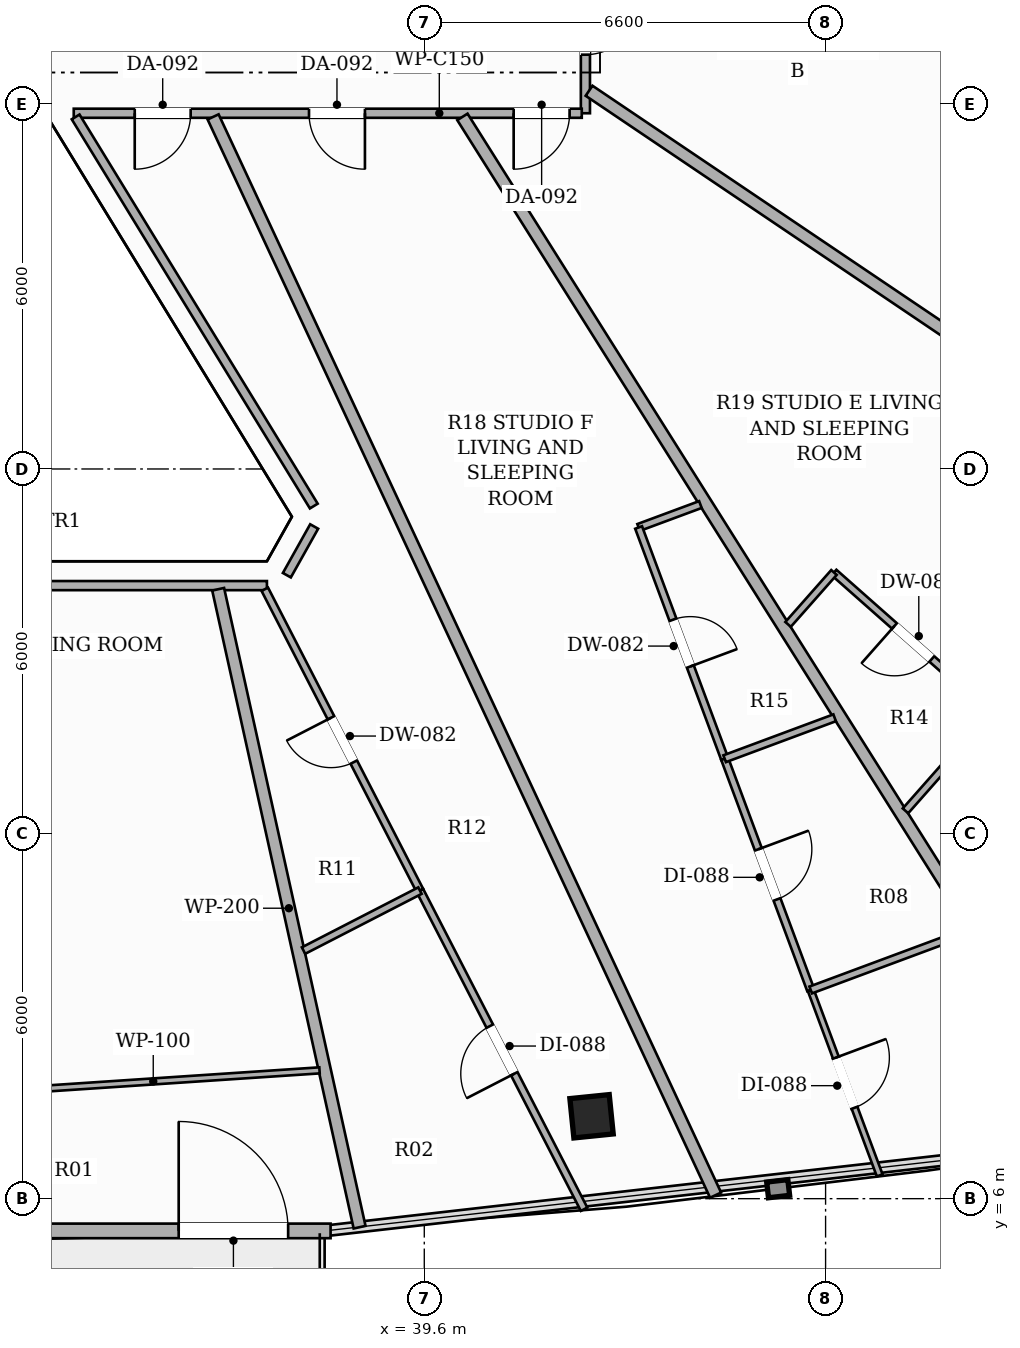
"""IFC4 building model, lengths in metres.
Left out: names, types, materials, properties, quantities, classifications, styles, units other than length and angle.
Written with IfcOpenShell. Run it as: python <this file> out.ifc"""

import sys

from ifc_helpers import new_model, si_unit, direction, frame, frame_2d, origin, origin_2d, place, context, subcontext, project, spatial, rectangle, hollow_rectangle, extrude, element, fill, save


model = new_model("IFC4")
c1 = context("Model", 3, precision=1e-05, world=origin(), true_north=direction((0.0, 1.0)))
c2 = subcontext(c1, "Body", "Model", "MODEL_VIEW")
j1 = project(units=[si_unit("LENGTHUNIT", "METRE"), si_unit("PLANEANGLEUNIT", "RADIAN")], contexts=[c1])
p1 = place(None, origin())
s1 = spatial("IfcSite", under=j1, at=p1, CompositionType="ELEMENT")
p2 = place(p1, origin())
s2 = spatial("IfcBuilding", under=s1, at=p2, CompositionType="ELEMENT")
p3 = place(p2, frame((0.0, 0.0, 256.85)))
s3 = spatial("IfcBuildingStorey", under=s2, at=p3, CompositionType="ELEMENT", Elevation=256.85)
p4 = place(p3, frame((42.351, 7.355, 0.0), z_axis=(0.0, 0.0, 1.0), x_axis=(0.994880708829, 0.101056297183, 0.0)))
e1 = element("IfcColumn", 1, at=p4, inside=s3, PredefinedType="COLUMN", context=c2, shape_type="SweptSolid", body=[
    extrude(hollow_rectangle(XDim=0.65, YDim=0.65, WallThickness=0.022, at=origin_2d()), origin(), (0.0, 0.0, 1.0), 3.3),
])
p5 = place(p3, frame((27.941, 5.47, 0.0), z_axis=(0.0, 0.0, 1.0), x_axis=(1.0, 0.0, 0.0)))
e2 = element("IfcWall", 2, at=p5, inside=s3, PredefinedType="SOLIDWALL", context=c2, shape_type="SweptSolid", body=[
    extrude(rectangle(XDim=10.118, YDim=0.24, at=frame_2d((5.059, 0.0))), origin(), (0.0, 0.0, 1.0), 2.624),
])
p6 = place(p5, frame((7.62, 0.0, 0.0)))
e3 = element("IfcOpeningElement", 3, at=p6, cuts=e2, PredefinedType="OPENING", context=c2, shape_type="SweptSolid", body=[
    extrude(rectangle(XDim=1.8, YDim=2.2, at=frame_2d((0.9, 1.1))), frame((0.0, 0.13, 0.0), z_axis=(0.0, -1.0, 0.0), x_axis=(1.0, 0.0, 0.0)), (0.0, 0.0, 1.0), 0.26),
])
p7 = place(p3, frame((49.146, 24.147, 0.0), z_axis=(0.0, 0.0, 1.0), x_axis=(-0.514275407092, 0.857625096216, 0.0)))
e4 = element("IfcWall", 4, at=p7, inside=s3, PredefinedType="SOLIDWALL", context=c2, shape_type="SweptSolid", body=[
    extrude(rectangle(XDim=9.777, YDim=0.24, at=frame_2d((4.889, 0.0))), origin(), (0.0, 0.0, 1.0), 2.624),
])
p8 = place(p7, frame((7.279, 0.0, 0.0)))
e5 = element("IfcOpeningElement", 5, at=p8, cuts=e4, PredefinedType="OPENING", context=c2, shape_type="SweptSolid", body=[
    extrude(rectangle(XDim=1.8, YDim=2.2, at=frame_2d((0.9, 1.1))), frame((0.0, 0.13, 0.0), z_axis=(0.0, -1.0, 0.0), x_axis=(1.0, 0.0, 0.0)), (0.0, 0.0, 1.0), 0.26),
])
p9 = place(p3, frame((42.25, 26.59, 0.0), z_axis=(0.0, 0.0, 1.0), x_axis=(0.0, -1.0, 0.0)))
e6 = element("IfcWall", 6, at=p9, inside=s3, PredefinedType="PARTITIONING", context=c2, shape_type="SweptSolid", body=[
    extrude(rectangle(XDim=2.74, YDim=0.15, at=frame_2d((1.37, 0.0))), origin(), (0.0, 0.0, 1.0), 2.773),
])
p10 = place(p9, frame((0.897, 0.0, 0.0)))
e7 = element("IfcOpeningElement", 7, at=p10, cuts=e6, PredefinedType="OPENING", context=c2, shape_type="SweptSolid", body=[
    extrude(rectangle(XDim=0.88, YDim=2.1, at=frame_2d((0.44, 1.05))), frame((0.0, 0.085, 0.0), z_axis=(0.0, -1.0, 0.0), x_axis=(1.0, 0.0, 0.0)), (0.0, 0.0, 1.0), 0.17),
])
p11 = place(p3, frame((42.19, 23.85, 0.0), z_axis=(0.0, 0.0, 1.0), x_axis=(-1.0, 0.0, 0.0)))
e8 = element("IfcWall", 8, at=p11, inside=s3, PredefinedType="PARTITIONING", context=c2, shape_type="SweptSolid", body=[
    extrude(rectangle(XDim=8.355, YDim=0.15, at=frame_2d((4.177, 0.0))), origin(), (0.0, 0.0, 1.0), 2.565),
])
p12 = place(p11, frame((0.2, 0.0, 0.0)))
e9 = element("IfcOpeningElement", 9, at=p12, cuts=e8, PredefinedType="OPENING", context=c2, shape_type="SweptSolid", body=[
    extrude(rectangle(XDim=0.92, YDim=2.15, at=frame_2d((0.46, 1.075))), frame((0.0, 0.085, 0.0), z_axis=(0.0, -1.0, 0.0), x_axis=(1.0, 0.0, 0.0)), (0.0, 0.0, 1.0), 0.17),
])
p13 = place(p11, frame((3.566, 0.0, 0.0)))
e10 = element("IfcOpeningElement", 10, at=p13, cuts=e8, PredefinedType="OPENING", context=c2, shape_type="SweptSolid", body=[
    extrude(rectangle(XDim=0.92, YDim=2.15, at=frame_2d((0.46, 1.075))), frame((0.0, 0.085, 0.0), z_axis=(0.0, -1.0, 0.0), x_axis=(1.0, 0.0, 0.0)), (0.0, 0.0, 1.0), 0.17),
])
p14 = place(p11, frame((6.432, 0.0, 0.0)))
e11 = element("IfcOpeningElement", 11, at=p14, cuts=e8, PredefinedType="OPENING", context=c2, shape_type="SweptSolid", body=[
    extrude(rectangle(XDim=0.92, YDim=2.15, at=frame_2d((0.46, 1.075))), frame((0.0, 0.085, 0.0), z_axis=(0.0, -1.0, 0.0), x_axis=(1.0, 0.0, 0.0)), (0.0, 0.0, 1.0), 0.17),
])
p15 = place(p3, frame((33.866, 23.79, 0.0), z_axis=(0.0, 0.0, 1.0), x_axis=(0.522011859837, -0.852938226479, 0.0)))
e12 = element("IfcWall", 12, at=p15, inside=s3, PredefinedType="PARTITIONING", context=c2, shape_type="SweptSolid", body=[
    extrude(rectangle(XDim=7.504, YDim=0.15, at=frame_2d((3.752, 0.0))), origin(), (0.0, 0.0, 1.0), 2.773),
])
p16 = place(p3, frame((37.789, 17.054, 0.0), z_axis=(0.0, 0.0, 1.0), x_axis=(-0.488935266506, -0.872320070368, 0.0)))
e13 = element("IfcWall", 13, at=p16, inside=s3, PredefinedType="PARTITIONING", context=c2, shape_type="SweptSolid", body=[
    extrude(rectangle(XDim=0.918, YDim=0.15, at=frame_2d((0.459, 0.0))), origin(), (0.0, 0.0, 1.0), 3.06),
])
p17 = place(p3, frame((37.012, 16.082, 0.0), z_axis=(0.0, 0.0, 1.0), x_axis=(-1.0, 0.0, 0.0)))
e14 = element("IfcWall", 14, at=p17, inside=s3, PredefinedType="PARTITIONING", context=c2, shape_type="SweptSolid", body=[
    extrude(rectangle(XDim=8.024, YDim=0.15, at=frame_2d((4.012, 0.0))), origin(), (0.0, 0.0, 1.0), 2.773),
])
p18 = place(p3, frame((36.21, 16.022, 0.0), z_axis=(0.0, 0.0, 1.0), x_axis=(0.216451711791, -0.976293325012, 0.0)))
e15 = element("IfcWall", 15, at=p18, inside=s3, PredefinedType="PARTITIONING", context=c2, shape_type="SweptSolid", body=[
    extrude(rectangle(XDim=10.746, YDim=0.2, at=frame_2d((5.373, 0.0))), origin(), (0.0, 0.0, 1.0), 2.492),
])
p19 = place(p3, frame((52.284, 17.493, 0.0), z_axis=(0.0, 0.0, 1.0), x_axis=(-0.829053532208, 0.559169241584, 0.0)))
e16 = element("IfcWall", 16, at=p19, inside=s3, PredefinedType="PARTITIONING", context=c2, shape_type="SweptSolid", body=[
    extrude(rectangle(XDim=12.031, YDim=0.2, at=frame_2d((6.015, 0.0))), origin(), (0.0, 0.0, 1.0), 2.492),
])
p20 = place(p3, frame((50.863, 6.899, 0.0), z_axis=(0.0, 0.0, 1.0), x_axis=(-0.532843438342, 0.846213844259, 0.0)))
e17 = element("IfcWall", 17, at=p20, inside=s3, PredefinedType="PARTITIONING", context=c2, shape_type="SweptSolid", body=[
    extrude(rectangle(XDim=19.961, YDim=0.2, at=frame_2d((9.98, 0.0))), origin(), (0.0, 0.0, 1.0), 2.492),
])
p21 = place(p3, frame((44.391, 6.058, 0.0), z_axis=(0.0, 0.0, 1.0), x_axis=(-0.422434507673, 0.906393450289, 0.0)))
e18 = element("IfcWall", 18, at=p21, inside=s3, PredefinedType="PARTITIONING", context=c2, shape_type="SweptSolid", body=[
    extrude(rectangle(XDim=19.563, YDim=0.2, at=frame_2d((9.782, 0.0))), origin(), (0.0, 0.0, 1.0), 2.492),
])
p22 = place(p3, frame((37.877, 8.11, 0.0), z_axis=(0.0, 0.0, 1.0), x_axis=(-0.997794804299, -0.066374155471, 0.0)))
e19 = element("IfcWall", 19, at=p22, inside=s3, PredefinedType="PARTITIONING", context=c2, shape_type="SweptSolid", body=[
    extrude(rectangle(XDim=10.851, YDim=0.1, at=frame_2d((5.425, 0.0))), origin(), (0.0, 0.0, 1.0), 2.492),
])
p23 = place(p22, frame((5.581, 0.0, 0.0)))
e20 = element("IfcOpeningElement", 20, at=p23, cuts=e19, PredefinedType="OPENING", context=c2, shape_type="SweptSolid", body=[
    extrude(rectangle(XDim=0.88, YDim=2.1, at=frame_2d((0.44, 1.05))), frame((0.0, 0.06, 0.0), z_axis=(0.0, -1.0, 0.0), x_axis=(1.0, 0.0, 0.0)), (0.0, 0.0, 1.0), 0.12),
])
p24 = place(p3, frame((48.943, 13.995, 0.0), z_axis=(0.0, 0.0, 1.0), x_axis=(-0.749231040751, 0.662308725275, 0.0)))
e21 = element("IfcWall", 21, at=p24, inside=s3, PredefinedType="PARTITIONING", context=c2, shape_type="SweptSolid", body=[
    extrude(rectangle(XDim=3.477, YDim=0.12, at=frame_2d((1.739, 0.0))), origin(), (0.0, 0.0, 1.0), 2.565),
])
p25 = place(p24, frame((1.329, 0.0, 0.0)))
e22 = element("IfcOpeningElement", 22, at=p25, cuts=e21, PredefinedType="OPENING", context=c2, shape_type="SweptSolid", body=[
    extrude(rectangle(XDim=0.82, YDim=2.1, at=frame_2d((0.41, 1.05))), frame((0.0, 0.07, 0.0), z_axis=(0.0, -1.0, 0.0), x_axis=(1.0, 0.0, 0.0)), (0.0, 0.0, 1.0), 0.14),
])
p26 = place(p3, frame((46.338, 16.298, 0.0), z_axis=(0.0, 0.0, 1.0), x_axis=(-0.662287293934, -0.749249985181, 0.0)))
e23 = element("IfcWall", 23, at=p26, inside=s3, PredefinedType="PARTITIONING", context=c2, shape_type="SweptSolid", body=[
    extrude(rectangle(XDim=1.14, YDim=0.12, at=frame_2d((0.57, 0.0))), origin(), (0.0, 0.0, 1.0), 3.06),
])
p27 = place(p3, frame((48.943, 13.995, 0.0), z_axis=(0.0, 0.0, 1.0), x_axis=(-0.662212567735, -0.749316031547, 0.0)))
e24 = element("IfcWall", 24, at=p27, inside=s3, PredefinedType="PARTITIONING", context=c2, shape_type="SweptSolid", body=[
    extrude(rectangle(XDim=2.158, YDim=0.12, at=frame_2d((1.079, 0.0))), origin(), (0.0, 0.0, 1.0), 2.565),
])
p28 = place(p3, frame((44.141, 17.415, 0.0), z_axis=(0.0, 0.0, 1.0), x_axis=(-0.937563848777, -0.347813210599, 0.0)))
e25 = element("IfcWall", 25, at=p28, inside=s3, PredefinedType="PARTITIONING", context=c2, shape_type="SweptSolid", body=[
    extrude(rectangle(XDim=1.084, YDim=0.12, at=frame_2d((0.542, 0.0))), origin(), (0.0, 0.0, 1.0), 2.773),
])
p29 = place(p3, frame((43.125, 17.038, 0.0), z_axis=(0.0, 0.0, 1.0), x_axis=(0.348728795746, -0.937223680355, 0.0)))
e26 = element("IfcWall", 26, at=p29, inside=s3, PredefinedType="PARTITIONING", context=c2, shape_type="SweptSolid", body=[
    extrude(rectangle(XDim=4.058, YDim=0.12, at=frame_2d((2.029, 0.0))), origin(), (0.0, 0.0, 1.0), 2.773),
])
p30 = place(p29, frame((1.619, 0.0, 0.0)))
e27 = element("IfcOpeningElement", 27, at=p30, cuts=e26, PredefinedType="OPENING", context=c2, shape_type="SweptSolid", body=[
    extrude(rectangle(XDim=0.82, YDim=2.1, at=frame_2d((0.41, 1.05))), frame((0.0, 0.07, 0.0), z_axis=(0.0, -1.0, 0.0), x_axis=(1.0, 0.0, 0.0)), (0.0, 0.0, 1.0), 0.14),
])
p31 = place(p3, frame((44.54, 13.235, 0.0), z_axis=(0.0, 0.0, 1.0), x_axis=(0.348709131935, -0.937230996769, 0.0)))
e28 = element("IfcWall", 28, at=p31, inside=s3, PredefinedType="PARTITIONING", context=c2, shape_type="SweptSolid", body=[
    extrude(rectangle(XDim=4.058, YDim=0.12, at=frame_2d((2.029, 0.0))), origin(), (0.0, 0.0, 1.0), 3.06),
])
p32 = place(p31, frame((1.589, 0.0, 0.0)))
e29 = element("IfcOpeningElement", 29, at=p32, cuts=e28, PredefinedType="OPENING", context=c2, shape_type="SweptSolid", body=[
    extrude(rectangle(XDim=0.88, YDim=2.1, at=frame_2d((0.44, 1.05))), frame((0.0, 0.07, 0.0), z_axis=(0.0, -1.0, 0.0), x_axis=(1.0, 0.0, 0.0)), (0.0, 0.0, 1.0), 0.14),
])
p33 = place(p3, frame((45.955, 9.432, 0.0), z_axis=(0.0, 0.0, 1.0), x_axis=(0.34888547359, -0.937165367647, 0.0)))
e30 = element("IfcWall", 30, at=p33, inside=s3, PredefinedType="PARTITIONING", context=c2, shape_type="SweptSolid", body=[
    extrude(rectangle(XDim=3.253, YDim=0.1, at=frame_2d((1.626, 0.0))), origin(), (0.0, 0.0, 1.0), 2.492),
])
p34 = place(p33, frame((1.187, 0.0, 0.0)))
e31 = element("IfcOpeningElement", 31, at=p34, cuts=e30, PredefinedType="OPENING", context=c2, shape_type="SweptSolid", body=[
    extrude(rectangle(XDim=0.88, YDim=2.1, at=frame_2d((0.44, 1.05))), frame((0.0, 0.06, 0.0), z_axis=(0.0, -1.0, 0.0), x_axis=(1.0, 0.0, 0.0)), (0.0, 0.0, 1.0), 0.12),
])
p35 = place(p3, frame((46.349, 13.908, 0.0), z_axis=(0.0, 0.0, 1.0), x_axis=(-0.937271835507, -0.348599349347, 0.0)))
e32 = element("IfcWall", 32, at=p35, inside=s3, PredefinedType="PARTITIONING", context=c2, shape_type="SweptSolid", body=[
    extrude(rectangle(XDim=1.93, YDim=0.12, at=frame_2d((0.965, 0.0))), origin(), (0.0, 0.0, 1.0), 2.773),
])
p36 = place(p3, frame((48.558, 10.4, 0.0), z_axis=(0.0, 0.0, 1.0), x_axis=(-0.937286649549, -0.34855951655, 0.0)))
e33 = element("IfcWall", 33, at=p36, inside=s3, PredefinedType="PARTITIONING", context=c2, shape_type="SweptSolid", body=[
    extrude(rectangle(XDim=2.777, YDim=0.12, at=frame_2d((1.389, 0.0))), origin(), (0.0, 0.0, 1.0), 2.773),
])
p37 = place(p3, frame((39.529, 11.066, 0.0), z_axis=(0.0, 0.0, 1.0), x_axis=(-0.457798211716, 0.889056127221, 0.0)))
e34 = element("IfcWall", 34, at=p37, inside=s3, PredefinedType="PARTITIONING", context=c2, shape_type="SweptSolid", body=[
    extrude(rectangle(XDim=5.574, YDim=0.12, at=frame_2d((2.787, 0.0))), origin(), (0.0, 0.0, 1.0), 2.773),
])
p38 = place(p37, frame((2.377, 0.0, 0.0)))
e35 = element("IfcOpeningElement", 35, at=p38, cuts=e34, PredefinedType="OPENING", context=c2, shape_type="SweptSolid", body=[
    extrude(rectangle(XDim=0.82, YDim=2.1, at=frame_2d((0.41, 1.05))), frame((0.0, 0.07, 0.0), z_axis=(0.0, -1.0, 0.0), x_axis=(1.0, 0.0, 0.0)), (0.0, 0.0, 1.0), 0.14),
])
p39 = place(p3, frame((42.228, 5.826, 0.0), z_axis=(0.0, 0.0, 1.0), x_axis=(-0.457901041138, 0.889003170143, 0.0)))
e36 = element("IfcWall", 36, at=p39, inside=s3, PredefinedType="PARTITIONING", context=c2, shape_type="SweptSolid", body=[
    extrude(rectangle(XDim=5.894, YDim=0.12, at=frame_2d((2.947, 0.0))), origin(), (0.0, 0.0, 1.0), 2.492),
])
p40 = place(p39, frame((2.507, 0.0, 0.0)))
e37 = element("IfcOpeningElement", 37, at=p40, cuts=e36, PredefinedType="OPENING", context=c2, shape_type="SweptSolid", body=[
    extrude(rectangle(XDim=0.88, YDim=2.1, at=frame_2d((0.44, 1.05))), frame((0.0, 0.07, 0.0), z_axis=(0.0, -1.0, 0.0), x_axis=(1.0, 0.0, 0.0)), (0.0, 0.0, 1.0), 0.14),
])
p41 = place(p3, frame((39.529, 11.066, 0.0), z_axis=(0.0, 0.0, 1.0), x_axis=(-0.889105964634, -0.457701413207, 0.0)))
e38 = element("IfcWall", 38, at=p41, inside=s3, PredefinedType="PARTITIONING", context=c2, shape_type="SweptSolid", body=[
    extrude(rectangle(XDim=2.154, YDim=0.12, at=frame_2d((1.077, 0.0))), origin(), (0.0, 0.0, 1.0), 2.773),
])
p42 = place(p6, origin())
e39 = element("IfcDoor", 39, at=p42, inside=s3, OperationType="SINGLE_SWING_LEFT", PredefinedType="DOOR", context=c2, shape_type="SweptSolid", body=[
    extrude(rectangle(XDim=1.8, YDim=2.2, at=frame_2d((0.9, 1.1))), frame((0.0, 0.025, 0.0), z_axis=(0.0, -1.0, 0.0), x_axis=(1.0, 0.0, 0.0)), (0.0, 0.0, 1.0), 0.05),
])
fill(e3, e39)
p43 = place(p10, origin())
e40 = element("IfcDoor", 40, at=p43, inside=s3, OperationType="SINGLE_SWING_LEFT", PredefinedType="DOOR", context=c2, shape_type="SweptSolid", body=[
    extrude(rectangle(XDim=0.88, YDim=2.1, at=frame_2d((0.44, 1.05))), frame((0.0, 0.025, 0.0), z_axis=(0.0, -1.0, 0.0), x_axis=(1.0, 0.0, 0.0)), (0.0, 0.0, 1.0), 0.05),
])
fill(e7, e40)
p44 = place(p12, origin())
e41 = element("IfcDoor", 41, at=p44, inside=s3, OperationType="SINGLE_SWING_RIGHT", PredefinedType="DOOR", context=c2, shape_type="SweptSolid", body=[
    extrude(rectangle(XDim=0.92, YDim=2.15, at=frame_2d((0.46, 1.075))), frame((0.0, 0.025, 0.0), z_axis=(0.0, -1.0, 0.0), x_axis=(1.0, 0.0, 0.0)), (0.0, 0.0, 1.0), 0.05),
])
fill(e9, e41)
p45 = place(p25, origin())
e42 = element("IfcDoor", 42, at=p45, inside=s3, OperationType="SINGLE_SWING_RIGHT", PredefinedType="DOOR", context=c2, shape_type="SweptSolid", body=[
    extrude(rectangle(XDim=0.82, YDim=2.1, at=frame_2d((0.41, 1.05))), frame((0.0, 0.025, 0.0), z_axis=(0.0, -1.0, 0.0), x_axis=(1.0, 0.0, 0.0)), (0.0, 0.0, 1.0), 0.05),
])
fill(e22, e42)
p46 = place(p13, origin())
e43 = element("IfcDoor", 43, at=p46, inside=s3, OperationType="SINGLE_SWING_LEFT", PredefinedType="DOOR", context=c2, shape_type="SweptSolid", body=[
    extrude(rectangle(XDim=0.92, YDim=2.15, at=frame_2d((0.46, 1.075))), frame((0.0, 0.025, 0.0), z_axis=(0.0, -1.0, 0.0), x_axis=(1.0, 0.0, 0.0)), (0.0, 0.0, 1.0), 0.05),
])
fill(e10, e43)
p47 = place(p30, origin())
e44 = element("IfcDoor", 44, at=p47, inside=s3, OperationType="SINGLE_SWING_RIGHT", PredefinedType="DOOR", context=c2, shape_type="SweptSolid", body=[
    extrude(rectangle(XDim=0.82, YDim=2.1, at=frame_2d((0.41, 1.05))), frame((0.0, 0.025, 0.0), z_axis=(0.0, -1.0, 0.0), x_axis=(1.0, 0.0, 0.0)), (0.0, 0.0, 1.0), 0.05),
])
fill(e27, e44)
p48 = place(p32, origin())
e45 = element("IfcDoor", 45, at=p48, inside=s3, OperationType="SINGLE_SWING_LEFT", PredefinedType="DOOR", context=c2, shape_type="SweptSolid", body=[
    extrude(rectangle(XDim=0.88, YDim=2.1, at=frame_2d((0.44, 1.05))), frame((0.0, 0.025, 0.0), z_axis=(0.0, -1.0, 0.0), x_axis=(1.0, 0.0, 0.0)), (0.0, 0.0, 1.0), 0.05),
])
fill(e29, e45)
p49 = place(p34, origin())
e46 = element("IfcDoor", 46, at=p49, inside=s3, OperationType="SINGLE_SWING_LEFT", PredefinedType="DOOR", context=c2, shape_type="SweptSolid", body=[
    extrude(rectangle(XDim=0.88, YDim=2.1, at=frame_2d((0.44, 1.05))), frame((0.0, 0.025, 0.0), z_axis=(0.0, -1.0, 0.0), x_axis=(1.0, 0.0, 0.0)), (0.0, 0.0, 1.0), 0.05),
])
fill(e31, e46)
p50 = place(p14, origin())
e47 = element("IfcDoor", 47, at=p50, inside=s3, OperationType="SINGLE_SWING_RIGHT", PredefinedType="DOOR", context=c2, shape_type="SweptSolid", body=[
    extrude(rectangle(XDim=0.92, YDim=2.15, at=frame_2d((0.46, 1.075))), frame((0.0, 0.025, 0.0), z_axis=(0.0, -1.0, 0.0), x_axis=(1.0, 0.0, 0.0)), (0.0, 0.0, 1.0), 0.05),
])
fill(e11, e47)
p51 = place(p38, origin())
e48 = element("IfcDoor", 48, at=p51, inside=s3, OperationType="SINGLE_SWING_RIGHT", PredefinedType="DOOR", context=c2, shape_type="SweptSolid", body=[
    extrude(rectangle(XDim=0.82, YDim=2.1, at=frame_2d((0.41, 1.05))), frame((0.0, 0.025, 0.0), z_axis=(0.0, -1.0, 0.0), x_axis=(1.0, 0.0, 0.0)), (0.0, 0.0, 1.0), 0.05),
])
fill(e35, e48)
p52 = place(p40, origin())
e49 = element("IfcDoor", 49, at=p52, inside=s3, OperationType="SINGLE_SWING_LEFT", PredefinedType="DOOR", context=c2, shape_type="SweptSolid", body=[
    extrude(rectangle(XDim=0.88, YDim=2.1, at=frame_2d((0.44, 1.05))), frame((0.0, 0.025, 0.0), z_axis=(0.0, -1.0, 0.0), x_axis=(1.0, 0.0, 0.0)), (0.0, 0.0, 1.0), 0.05),
])
fill(e37, e49)
save(model, sys.argv[1])
